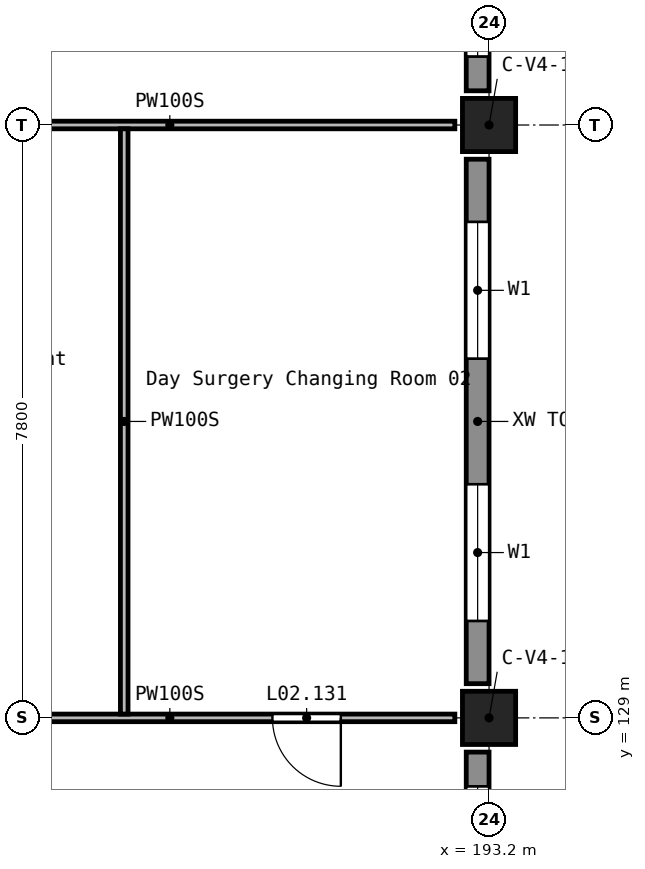
"""IFC4 building model, lengths in metres.
Left out: names, types, materials, properties, quantities, classifications, styles, units other than length and angle.
Written with IfcOpenShell. Run it as: python <this file> out.ifc"""

import sys

from ifc_helpers import new_model, si_unit, direction, frame, frame_2d, origin, origin_2d, place, context, subcontext, project, spatial, rectangle, extrude, element, fill, save


model = new_model("IFC4")
c1 = context("Model", 3, precision=1e-05, world=origin(), true_north=direction((0.0, 1.0)))
c2 = subcontext(c1, "Body", "Model", "MODEL_VIEW")
j1 = project(units=[si_unit("LENGTHUNIT", "METRE"), si_unit("PLANEANGLEUNIT", "RADIAN")], contexts=[c1])
p1 = place(None, origin())
s1 = spatial("IfcSite", under=j1, at=p1, CompositionType="ELEMENT")
p2 = place(p1, origin())
s2 = spatial("IfcBuilding", under=s1, at=p2, CompositionType="ELEMENT")
p3 = place(p2, frame((0.0, 0.0, 12.6)))
s3 = spatial("IfcBuildingStorey", under=s2, at=p3, CompositionType="ELEMENT", Elevation=12.6)
for number, where, z_axis, x_axis in (
    (1, (193.2, 129.0, 0.0), (0.0, 0.0, 1.0), (1.0, 0.0, 0.0)),
    (2, (193.2, 136.8, 0.0), (0.0, 0.0, 1.0), (1.0, 0.0, 0.0)),
):
    element("IfcColumn", number, at=place(p3, frame(where, z_axis=z_axis, x_axis=x_axis)), inside=s3, PredefinedType="COLUMN", context=c2, shape_type="SweptSolid", body=[
        extrude(rectangle(XDim=0.7, YDim=0.7, at=origin_2d()), origin(), (0.0, 0.0, 1.0), 4.2),
    ])
p4 = place(p3, frame((193.05, 125.85, 0.0), z_axis=(0.0, 0.0, 1.0), x_axis=(0.0, 1.0, 0.0)))
e3 = element("IfcWall", 3, at=p4, inside=s3, PredefinedType="STANDARD", context=c2, shape_type="SweptSolid", body=[
    extrude(rectangle(XDim=2.7, YDim=0.3, at=frame_2d((1.35, 0.0))), origin(), (0.0, 0.0, 1.0), 3.05),
])
p5 = place(p4, frame((0.45, 0.0, 0.9)))
e4 = element("IfcOpeningElement", 4, at=p5, cuts=e3, PredefinedType="OPENING", context=c2, shape_type="SweptSolid", body=[
    extrude(rectangle(XDim=1.8, YDim=1.5, at=frame_2d((0.9, 0.75))), frame((0.0, 0.16, 0.0), z_axis=(0.0, -1.0, 0.0), x_axis=(1.0, 0.0, 0.0)), (0.0, 0.0, 1.0), 0.32),
])
p6 = place(p3, frame((193.05, 129.45, 0.0), z_axis=(0.0, 0.0, 1.0), x_axis=(0.0, 1.0, 0.0)))
e5 = element("IfcWall", 5, at=p6, inside=s3, PredefinedType="STANDARD", context=c2, shape_type="SweptSolid", body=[
    extrude(rectangle(XDim=6.9, YDim=0.3, at=frame_2d((3.45, 0.0))), origin(), (0.0, 0.0, 1.0), 3.05),
])
p7 = place(p6, frame((0.825, 0.0, 0.9)))
e6 = element("IfcOpeningElement", 6, at=p7, cuts=e5, PredefinedType="OPENING", context=c2, shape_type="SweptSolid", body=[
    extrude(rectangle(XDim=1.8, YDim=1.5, at=frame_2d((0.9, 0.75))), frame((0.0, 0.16, 0.0), z_axis=(0.0, -1.0, 0.0), x_axis=(1.0, 0.0, 0.0)), (0.0, 0.0, 1.0), 0.32),
])
p8 = place(p6, frame((4.275, 0.0, 0.9)))
e7 = element("IfcOpeningElement", 7, at=p8, cuts=e5, PredefinedType="OPENING", context=c2, shape_type="SweptSolid", body=[
    extrude(rectangle(XDim=1.8, YDim=1.5, at=frame_2d((0.9, 0.75))), frame((0.0, 0.16, 0.0), z_axis=(0.0, -1.0, 0.0), x_axis=(1.0, 0.0, 0.0)), (0.0, 0.0, 1.0), 0.32),
])
p9 = place(p3, frame((193.05, 137.25, 0.0), z_axis=(0.0, 0.0, 1.0), x_axis=(0.0, 1.0, 0.0)))
e8 = element("IfcWall", 8, at=p9, inside=s3, PredefinedType="STANDARD", context=c2, shape_type="SweptSolid", body=[
    extrude(rectangle(XDim=2.7, YDim=0.3, at=frame_2d((1.35, 0.0))), origin(), (0.0, 0.0, 1.0), 3.05),
])
p10 = place(p9, frame((0.45, 0.0, 0.9)))
e9 = element("IfcOpeningElement", 9, at=p10, cuts=e8, PredefinedType="OPENING", context=c2, shape_type="SweptSolid", body=[
    extrude(rectangle(XDim=1.8, YDim=1.5, at=frame_2d((0.9, 0.75))), frame((0.0, 0.16, 0.0), z_axis=(0.0, -1.0, 0.0), x_axis=(1.0, 0.0, 0.0)), (0.0, 0.0, 1.0), 0.32),
])
p11 = place(p3, frame((192.75, 129.0, 0.0), z_axis=(0.0, 0.0, 1.0), x_axis=(-1.0, 0.0, 0.0)))
e10 = element("IfcWall", 10, at=p11, inside=s3, PredefinedType="PARTITIONING", context=c2, shape_type="SweptSolid", body=[
    extrude(rectangle(XDim=7.5, YDim=0.1, at=frame_2d((3.75, 0.0))), origin(), (0.0, 0.0, 1.0), 3.85),
])
p12 = place(p11, frame((5.7, 0.0, 0.0)))
e11 = element("IfcOpeningElement", 11, at=p12, cuts=e10, PredefinedType="OPENING", context=c2, shape_type="SweptSolid", body=[
    extrude(rectangle(XDim=0.9, YDim=2.1, at=frame_2d((0.45, 1.05))), frame((0.0, 0.06, 0.0), z_axis=(0.0, -1.0, 0.0), x_axis=(1.0, 0.0, 0.0)), (0.0, 0.0, 1.0), 0.12),
])
p13 = place(p11, frame((1.5, 0.0, 0.0)))
e12 = element("IfcOpeningElement", 12, at=p13, cuts=e10, PredefinedType="OPENING", context=c2, shape_type="SweptSolid", body=[
    extrude(rectangle(XDim=0.9, YDim=2.1, at=frame_2d((0.45, 1.05))), frame((0.0, 0.06, 0.0), z_axis=(0.0, -1.0, 0.0), x_axis=(1.0, 0.0, 0.0)), (0.0, 0.0, 1.0), 0.12),
])
p14 = place(p3, frame((192.75, 136.8, 0.0), z_axis=(0.0, 0.0, 1.0), x_axis=(-1.0, 0.0, 0.0)))
e13 = element("IfcWall", 13, at=p14, inside=s3, PredefinedType="PARTITIONING", context=c2, shape_type="SweptSolid", body=[
    extrude(rectangle(XDim=7.5, YDim=0.1, at=frame_2d((3.75, 0.0))), origin(), (0.0, 0.0, 1.0), 3.85),
])
p15 = place(p3, frame((188.4, 129.05, 0.0), z_axis=(0.0, 0.0, 1.0), x_axis=(0.0, 1.0, 0.0)))
e14 = element("IfcWall", 14, at=p15, inside=s3, PredefinedType="PARTITIONING", context=c2, shape_type="SweptSolid", body=[
    extrude(rectangle(XDim=7.7, YDim=0.1, at=frame_2d((3.85, 0.0))), origin(), (0.0, 0.0, 1.0), 3.85),
])
p16 = place(p5, origin())
e15 = element("IfcWindow", 15, at=p16, inside=s3, PartitioningType="SINGLE_PANEL", PredefinedType="WINDOW", context=c2, shape_type="SweptSolid", body=[
    extrude(rectangle(XDim=1.8, YDim=1.5, at=frame_2d((0.9, 0.75))), frame((0.0, 0.03, 0.0), z_axis=(0.0, -1.0, 0.0), x_axis=(1.0, 0.0, 0.0)), (0.0, 0.0, 1.0), 0.06),
])
fill(e4, e15)
p17 = place(p7, origin())
e16 = element("IfcWindow", 16, at=p17, inside=s3, PartitioningType="SINGLE_PANEL", PredefinedType="WINDOW", context=c2, shape_type="SweptSolid", body=[
    extrude(rectangle(XDim=1.8, YDim=1.5, at=frame_2d((0.9, 0.75))), frame((0.0, 0.03, 0.0), z_axis=(0.0, -1.0, 0.0), x_axis=(1.0, 0.0, 0.0)), (0.0, 0.0, 1.0), 0.06),
])
fill(e6, e16)
p18 = place(p8, origin())
e17 = element("IfcWindow", 17, at=p18, inside=s3, PartitioningType="SINGLE_PANEL", PredefinedType="WINDOW", context=c2, shape_type="SweptSolid", body=[
    extrude(rectangle(XDim=1.8, YDim=1.5, at=frame_2d((0.9, 0.75))), frame((0.0, 0.03, 0.0), z_axis=(0.0, -1.0, 0.0), x_axis=(1.0, 0.0, 0.0)), (0.0, 0.0, 1.0), 0.06),
])
fill(e7, e17)
p19 = place(p10, origin())
e18 = element("IfcWindow", 18, at=p19, inside=s3, PartitioningType="SINGLE_PANEL", PredefinedType="WINDOW", context=c2, shape_type="SweptSolid", body=[
    extrude(rectangle(XDim=1.8, YDim=1.5, at=frame_2d((0.9, 0.75))), frame((0.0, 0.03, 0.0), z_axis=(0.0, -1.0, 0.0), x_axis=(1.0, 0.0, 0.0)), (0.0, 0.0, 1.0), 0.06),
])
fill(e9, e18)
p20 = place(p13, frame((0.9, 0.0, 0.0), z_axis=(0.0, 0.0, 1.0), x_axis=(-1.0, 0.0, 0.0)))
e19 = element("IfcDoor", 19, at=p20, inside=s3, OperationType="SINGLE_SWING_RIGHT", PredefinedType="DOOR", context=c2, shape_type="SweptSolid", body=[
    extrude(rectangle(XDim=0.9, YDim=2.1, at=frame_2d((0.45, 1.05))), frame((0.0, 0.025, 0.0), z_axis=(0.0, -1.0, 0.0), x_axis=(1.0, 0.0, 0.0)), (0.0, 0.0, 1.0), 0.05),
])
fill(e12, e19)
save(model, sys.argv[1])
